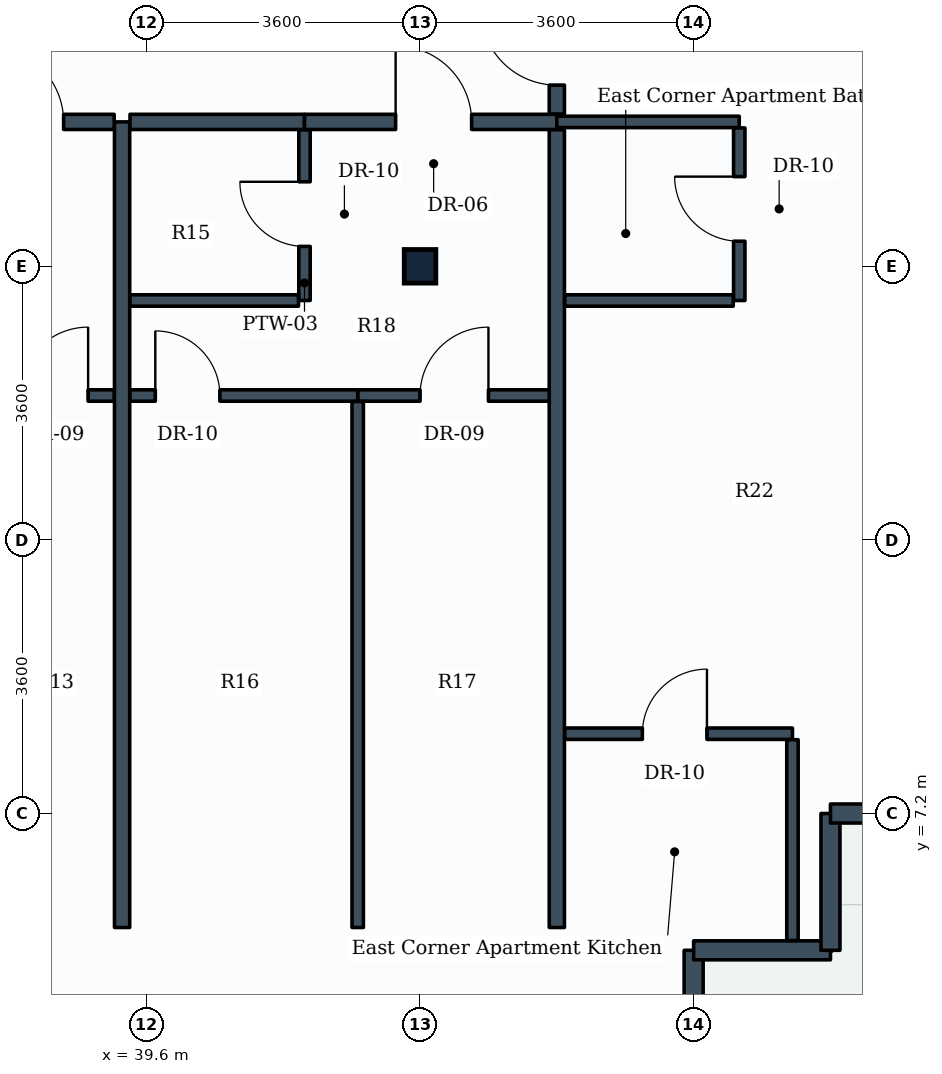
"""IFC4 building model, lengths in metres.
Left out: names, types, materials, properties, quantities, classifications, styles, units other than length and angle.
Written with IfcOpenShell. Run it as: python <this file> out.ifc"""

import sys

from ifc_helpers import new_model, si_unit, direction, frame, frame_2d, origin, origin_2d, place, context, subcontext, project, spatial, rectangle, i_section, extrude, element, fill, save


model = new_model("IFC4")
c1 = context("Model", 3, precision=1e-05, world=origin(), true_north=direction((0.0, 1.0)))
c2 = subcontext(c1, "Body", "Model", "MODEL_VIEW")
j1 = project(units=[si_unit("LENGTHUNIT", "METRE"), si_unit("PLANEANGLEUNIT", "RADIAN")], contexts=[c1])
p1 = place(None, origin())
s1 = spatial("IfcSite", under=j1, at=p1, CompositionType="ELEMENT")
p2 = place(p1, origin())
s2 = spatial("IfcBuilding", under=s1, at=p2, CompositionType="ELEMENT")
p3 = place(p2, frame((0.0, 0.0, 174.8)))
s3 = spatial("IfcBuildingStorey", under=s2, at=p3, CompositionType="ELEMENT", Elevation=174.8)
p4 = place(p3, frame((43.2, 14.4, 0.0), z_axis=(0.0, 0.0, 1.0), x_axis=(1.0, 0.0, 0.0)))
e1 = element("IfcColumn", 1, at=p4, inside=s3, PredefinedType="COLUMN", context=c2, shape_type="SweptSolid", body=[
    extrude(i_section(OverallWidth=0.416, OverallDepth=0.442, WebThickness=0.025, FlangeThickness=0.041, FilletRadius=0.015, at=origin_2d()), origin(), (0.0, 0.0, 1.0), 3.8),
])
p5 = place(p3, frame((46.8, 5.4, 0.0), z_axis=(0.0, 0.0, 1.0), x_axis=(0.0, -1.0, 0.0)))
e2 = element("IfcWall", 2, at=p5, inside=s3, PredefinedType="STANDARD", context=c2, shape_type="SweptSolid", body=[
    extrude(rectangle(XDim=1.8, YDim=0.25, at=frame_2d((0.9, 0.0))), origin(), (0.0, 0.0, 1.0), 2.93),
])
for number, where, z_axis, x_axis in (
    (3, (48.6, 5.4, 0.0), (0.0, 0.0, 1.0), (-1.0, 0.0, 0.0)),
    (4, (48.6, 7.2, 0.0), (0.0, 0.0, 1.0), (0.0, -1.0, 0.0)),
):
    element("IfcWall", number, at=place(p3, frame(where, z_axis=z_axis, x_axis=x_axis)), inside=s3, PredefinedType="STANDARD", context=c2, shape_type="SweptSolid", body=[
        extrude(rectangle(XDim=1.8, YDim=0.25, at=frame_2d((0.9, 0.0))), origin(), (0.0, 0.0, 1.0), 3.535),
    ])
p6 = place(p3, frame((50.4, 7.2, 0.0), z_axis=(0.0, 0.0, 1.0), x_axis=(-1.0, 0.0, 0.0)))
e5 = element("IfcWall", 5, at=p6, inside=s3, PredefinedType="STANDARD", context=c2, shape_type="SweptSolid", body=[
    extrude(rectangle(XDim=1.8, YDim=0.25, at=frame_2d((0.9, 0.0))), origin(), (0.0, 0.0, 1.0), 2.93),
])
p7 = place(p3, frame((39.28, 5.7, 0.0), z_axis=(0.0, 0.0, 1.0), x_axis=(0.0, 1.0, 0.0)))
e6 = element("IfcWall", 6, at=p7, inside=s3, PredefinedType="PARTITIONING", context=c2, shape_type="SweptSolid", body=[
    extrude(rectangle(XDim=10.6, YDim=0.2, at=frame_2d((5.3, 0.0))), origin(), (0.0, 0.0, 1.0), 3.17),
])
p8 = place(p3, frame((36.8, 16.3, 0.0), z_axis=(0.0, 0.0, 1.0), x_axis=(1.0, 0.0, 0.0)))
e7 = element("IfcWall", 7, at=p8, inside=s3, PredefinedType="PARTITIONING", context=c2, shape_type="SweptSolid", body=[
    extrude(rectangle(XDim=2.376, YDim=0.2, at=frame_2d((1.188, 0.0))), origin(), (0.0, 0.0, 1.0), 3.535),
])
p9 = place(p8, frame((0.711, 0.0, 0.0)))
e8 = element("IfcOpeningElement", 8, at=p9, cuts=e7, PredefinedType="OPENING", context=c2, shape_type="SweptSolid", body=[
    extrude(rectangle(XDim=1.0, YDim=2.1, at=frame_2d((0.5, 1.05))), frame((0.0, 0.11, 0.0), z_axis=(0.0, -1.0, 0.0), x_axis=(1.0, 0.0, 0.0)), (0.0, 0.0, 1.0), 0.22),
])
p10 = place(p3, frame((37.5, 12.7, 0.0), z_axis=(0.0, 0.0, 1.0), x_axis=(1.0, 0.0, 0.0)))
e9 = element("IfcWall", 9, at=p10, inside=s3, PredefinedType="PARTITIONING", context=c2, shape_type="SweptSolid", body=[
    extrude(rectangle(XDim=1.676, YDim=0.15, at=frame_2d((0.838, 0.0))), origin(), (0.0, 0.0, 1.0), 3.535),
])
p11 = place(p10, frame((0.433, 0.0, 0.0)))
e10 = element("IfcOpeningElement", 10, at=p11, cuts=e9, PredefinedType="OPENING", context=c2, shape_type="SweptSolid", body=[
    extrude(rectangle(XDim=0.9, YDim=2.1, at=frame_2d((0.45, 1.05))), frame((0.0, 0.085, 0.0), z_axis=(0.0, -1.0, 0.0), x_axis=(1.0, 0.0, 0.0)), (0.0, 0.0, 1.0), 0.17),
])
p12 = place(p3, frame((39.384, 16.3, 0.0), z_axis=(0.0, 0.0, 1.0), x_axis=(1.0, 0.0, 0.0)))
e11 = element("IfcWall", 11, at=p12, inside=s3, PredefinedType="PARTITIONING", context=c2, shape_type="SweptSolid", body=[
    extrude(rectangle(XDim=2.296, YDim=0.2, at=frame_2d((1.148, 0.0))), origin(), (0.0, 0.0, 1.0), 3.17),
])
p13 = place(p3, frame((41.68, 13.95, 0.0), z_axis=(0.0, 0.0, 1.0), x_axis=(0.0, 1.0, 0.0)))
e12 = element("IfcWall", 12, at=p13, inside=s3, PredefinedType="PARTITIONING", context=c2, shape_type="SweptSolid", body=[
    extrude(rectangle(XDim=2.246, YDim=0.15, at=frame_2d((1.123, 0.0))), origin(), (0.0, 0.0, 1.0), 3.17),
])
p14 = place(p13, frame((0.712, 0.0, 0.0)))
e13 = element("IfcOpeningElement", 13, at=p14, cuts=e12, PredefinedType="OPENING", context=c2, shape_type="SweptSolid", body=[
    extrude(rectangle(XDim=0.85, YDim=2.1, at=frame_2d((0.425, 1.05))), frame((0.0, 0.085, 0.0), z_axis=(0.0, -1.0, 0.0), x_axis=(1.0, 0.0, 0.0)), (0.0, 0.0, 1.0), 0.17),
])
p15 = place(p3, frame((39.384, 13.95, 0.0), z_axis=(0.0, 0.0, 1.0), x_axis=(1.0, 0.0, 0.0)))
e14 = element("IfcWall", 14, at=p15, inside=s3, PredefinedType="PARTITIONING", context=c2, shape_type="SweptSolid", body=[
    extrude(rectangle(XDim=2.217, YDim=0.15, at=frame_2d((1.108, 0.0))), origin(), (0.0, 0.0, 1.0), 3.17),
])
p16 = place(p3, frame((41.68, 16.3, 0.0), z_axis=(0.0, 0.0, 1.0), x_axis=(1.0, 0.0, 0.0)))
e15 = element("IfcWall", 15, at=p16, inside=s3, PredefinedType="PARTITIONING", context=c2, shape_type="SweptSolid", body=[
    extrude(rectangle(XDim=3.32, YDim=0.2, at=frame_2d((1.66, 0.0))), origin(), (0.0, 0.0, 1.0), 3.18),
])
p17 = place(p16, frame((1.199, 0.0, 0.0)))
e16 = element("IfcOpeningElement", 16, at=p17, cuts=e15, PredefinedType="OPENING", context=c2, shape_type="SweptSolid", body=[
    extrude(rectangle(XDim=1.0, YDim=2.1, at=frame_2d((0.5, 1.05))), frame((0.0, 0.11, 0.0), z_axis=(0.0, -1.0, 0.0), x_axis=(1.0, 0.0, 0.0)), (0.0, 0.0, 1.0), 0.22),
])
p18 = place(p3, frame((42.38, 12.7, 0.0), z_axis=(0.0, 0.0, 1.0), x_axis=(1.0, 0.0, 0.0)))
e17 = element("IfcWall", 17, at=p18, inside=s3, PredefinedType="PARTITIONING", context=c2, shape_type="SweptSolid", body=[
    extrude(rectangle(XDim=2.62, YDim=0.15, at=frame_2d((1.31, 0.0))), origin(), (0.0, 0.0, 1.0), 3.18),
])
p19 = place(p18, frame((0.82, 0.0, 0.0)))
e18 = element("IfcOpeningElement", 18, at=p19, cuts=e17, PredefinedType="OPENING", context=c2, shape_type="SweptSolid", body=[
    extrude(rectangle(XDim=0.9, YDim=2.1, at=frame_2d((0.45, 1.05))), frame((0.0, 0.085, 0.0), z_axis=(0.0, -1.0, 0.0), x_axis=(1.0, 0.0, 0.0)), (0.0, 0.0, 1.0), 0.17),
])
p20 = place(p3, frame((39.384, 12.7, 0.0), z_axis=(0.0, 0.0, 1.0), x_axis=(1.0, 0.0, 0.0)))
e19 = element("IfcWall", 19, at=p20, inside=s3, PredefinedType="PARTITIONING", context=c2, shape_type="SweptSolid", body=[
    extrude(rectangle(XDim=2.996, YDim=0.15, at=frame_2d((1.498, 0.0))), origin(), (0.0, 0.0, 1.0), 3.17),
])
p21 = place(p20, frame((0.333, 0.0, 0.0)))
e20 = element("IfcOpeningElement", 20, at=p21, cuts=e19, PredefinedType="OPENING", context=c2, shape_type="SweptSolid", body=[
    extrude(rectangle(XDim=0.85, YDim=2.1, at=frame_2d((0.425, 1.05))), frame((0.0, 0.085, 0.0), z_axis=(0.0, -1.0, 0.0), x_axis=(1.0, 0.0, 0.0)), (0.0, 0.0, 1.0), 0.17),
])
p22 = place(p3, frame((42.38, 5.7, 0.0), z_axis=(0.0, 0.0, 1.0), x_axis=(0.0, 1.0, 0.0)))
e21 = element("IfcWall", 21, at=p22, inside=s3, PredefinedType="PARTITIONING", context=c2, shape_type="SweptSolid", body=[
    extrude(rectangle(XDim=6.921, YDim=0.15, at=frame_2d((3.46, 0.0))), origin(), (0.0, 0.0, 1.0), 3.17),
])
p23 = place(p3, frame((45.0, 5.7, 0.0), z_axis=(0.0, 0.0, 1.0), x_axis=(0.0, 1.0, 0.0)))
e22 = element("IfcWall", 22, at=p23, inside=s3, PredefinedType="PARTITIONING", context=c2, shape_type="SweptSolid", body=[
    extrude(rectangle(XDim=10.496, YDim=0.2, at=frame_2d((5.248, 0.0))), origin(), (0.0, 0.0, 1.0), 3.17),
])
p24 = place(p3, frame((45.0, 16.404, 0.0), z_axis=(0.0, 0.0, 1.0), x_axis=(0.0, 1.0, 0.0)))
e23 = element("IfcWall", 23, at=p24, inside=s3, PredefinedType="PARTITIONING", context=c2, shape_type="SweptSolid", body=[
    extrude(rectangle(XDim=1.667, YDim=0.2, at=frame_2d((0.833, 0.0))), origin(), (0.0, 0.0, 1.0), 3.535),
])
p25 = place(p24, frame((0.38, 0.0, 0.0)))
e24 = element("IfcOpeningElement", 24, at=p25, cuts=e23, PredefinedType="OPENING", context=c2, shape_type="SweptSolid", body=[
    extrude(rectangle(XDim=1.0, YDim=2.1, at=frame_2d((0.5, 1.05))), frame((0.0, 0.11, 0.0), z_axis=(0.0, -1.0, 0.0), x_axis=(1.0, 0.0, 0.0)), (0.0, 0.0, 1.0), 0.22),
])
p26 = place(p3, frame((45.0, 16.3, 0.0), z_axis=(0.0, 0.0, 1.0), x_axis=(1.0, 0.0, 0.0)))
e25 = element("IfcWall", 25, at=p26, inside=s3, PredefinedType="PARTITIONING", context=c2, shape_type="SweptSolid", body=[
    extrude(rectangle(XDim=2.4, YDim=0.15, at=frame_2d((1.2, 0.0))), origin(), (0.0, 0.0, 1.0), 3.535),
])
p27 = place(p3, frame((47.4, 13.95, 0.0), z_axis=(0.0, 0.0, 1.0), x_axis=(0.0, 1.0, 0.0)))
e26 = element("IfcWall", 26, at=p27, inside=s3, PredefinedType="PARTITIONING", context=c2, shape_type="SweptSolid", body=[
    extrude(rectangle(XDim=2.271, YDim=0.15, at=frame_2d((1.135, 0.0))), origin(), (0.0, 0.0, 1.0), 3.17),
])
p28 = place(p27, frame((0.78, 0.0, 0.0)))
e27 = element("IfcOpeningElement", 27, at=p28, cuts=e26, PredefinedType="OPENING", context=c2, shape_type="SweptSolid", body=[
    extrude(rectangle(XDim=0.85, YDim=2.1, at=frame_2d((0.425, 1.05))), frame((0.0, 0.085, 0.0), z_axis=(0.0, -1.0, 0.0), x_axis=(1.0, 0.0, 0.0)), (0.0, 0.0, 1.0), 0.17),
])
p29 = place(p3, frame((45.104, 13.95, 0.0), z_axis=(0.0, 0.0, 1.0), x_axis=(1.0, 0.0, 0.0)))
e28 = element("IfcWall", 28, at=p29, inside=s3, PredefinedType="PARTITIONING", context=c2, shape_type="SweptSolid", body=[
    extrude(rectangle(XDim=2.217, YDim=0.15, at=frame_2d((1.108, 0.0))), origin(), (0.0, 0.0, 1.0), 3.535),
])
p30 = place(p3, frame((45.104, 8.25, 0.0), z_axis=(0.0, 0.0, 1.0), x_axis=(1.0, 0.0, 0.0)))
e29 = element("IfcWall", 29, at=p30, inside=s3, PredefinedType="PARTITIONING", context=c2, shape_type="SweptSolid", body=[
    extrude(rectangle(XDim=2.996, YDim=0.15, at=frame_2d((1.498, 0.0))), origin(), (0.0, 0.0, 1.0), 3.535),
])
p31 = place(p30, frame((1.021, 0.0, 0.0)))
e30 = element("IfcOpeningElement", 30, at=p31, cuts=e29, PredefinedType="OPENING", context=c2, shape_type="SweptSolid", body=[
    extrude(rectangle(XDim=0.85, YDim=2.1, at=frame_2d((0.425, 1.05))), frame((0.0, 0.085, 0.0), z_axis=(0.0, -1.0, 0.0), x_axis=(1.0, 0.0, 0.0)), (0.0, 0.0, 1.0), 0.17),
])
p32 = place(p3, frame((48.1, 5.529, 0.0), z_axis=(0.0, 0.0, 1.0), x_axis=(0.0, 1.0, 0.0)))
e31 = element("IfcWall", 31, at=p32, inside=s3, PredefinedType="PARTITIONING", context=c2, shape_type="SweptSolid", body=[
    extrude(rectangle(XDim=2.642, YDim=0.15, at=frame_2d((1.321, 0.0))), origin(), (0.0, 0.0, 1.0), 3.535),
])
p33 = place(p9, origin())
e32 = element("IfcDoor", 32, at=p33, inside=s3, OperationType="SINGLE_SWING_LEFT", PredefinedType="DOOR", context=c2, shape_type="SweptSolid", body=[
    extrude(rectangle(XDim=1.0, YDim=2.1, at=frame_2d((0.5, 1.05))), frame((0.0, 0.025, 0.0), z_axis=(0.0, -1.0, 0.0), x_axis=(1.0, 0.0, 0.0)), (0.0, 0.0, 1.0), 0.05),
])
fill(e8, e32)
p34 = place(p11, origin())
e33 = element("IfcDoor", 33, at=p34, inside=s3, OperationType="SINGLE_SWING_RIGHT", PredefinedType="DOOR", context=c2, shape_type="SweptSolid", body=[
    extrude(rectangle(XDim=0.9, YDim=2.1, at=frame_2d((0.45, 1.05))), frame((0.0, 0.025, 0.0), z_axis=(0.0, -1.0, 0.0), x_axis=(1.0, 0.0, 0.0)), (0.0, 0.0, 1.0), 0.05),
])
fill(e10, e33)
p35 = place(p14, origin())
e34 = element("IfcDoor", 34, at=p35, inside=s3, OperationType="SINGLE_SWING_RIGHT", PredefinedType="DOOR", context=c2, shape_type="SweptSolid", body=[
    extrude(rectangle(XDim=0.85, YDim=2.1, at=frame_2d((0.425, 1.05))), frame((0.0, 0.025, 0.0), z_axis=(0.0, -1.0, 0.0), x_axis=(1.0, 0.0, 0.0)), (0.0, 0.0, 1.0), 0.05),
])
fill(e13, e34)
p36 = place(p17, origin())
e35 = element("IfcDoor", 35, at=p36, inside=s3, OperationType="SINGLE_SWING_LEFT", PredefinedType="DOOR", context=c2, shape_type="SweptSolid", body=[
    extrude(rectangle(XDim=1.0, YDim=2.1, at=frame_2d((0.5, 1.05))), frame((0.0, 0.025, 0.0), z_axis=(0.0, -1.0, 0.0), x_axis=(1.0, 0.0, 0.0)), (0.0, 0.0, 1.0), 0.05),
])
fill(e16, e35)
p37 = place(p19, origin())
e36 = element("IfcDoor", 36, at=p37, inside=s3, OperationType="SINGLE_SWING_RIGHT", PredefinedType="DOOR", context=c2, shape_type="SweptSolid", body=[
    extrude(rectangle(XDim=0.9, YDim=2.1, at=frame_2d((0.45, 1.05))), frame((0.0, 0.025, 0.0), z_axis=(0.0, -1.0, 0.0), x_axis=(1.0, 0.0, 0.0)), (0.0, 0.0, 1.0), 0.05),
])
fill(e18, e36)
p38 = place(p21, origin())
e37 = element("IfcDoor", 37, at=p38, inside=s3, OperationType="SINGLE_SWING_LEFT", PredefinedType="DOOR", context=c2, shape_type="SweptSolid", body=[
    extrude(rectangle(XDim=0.85, YDim=2.1, at=frame_2d((0.425, 1.05))), frame((0.0, 0.025, 0.0), z_axis=(0.0, -1.0, 0.0), x_axis=(1.0, 0.0, 0.0)), (0.0, 0.0, 1.0), 0.05),
])
fill(e20, e37)
p39 = place(p25, origin())
e38 = element("IfcDoor", 38, at=p39, inside=s3, OperationType="SINGLE_SWING_RIGHT", PredefinedType="DOOR", context=c2, shape_type="SweptSolid", body=[
    extrude(rectangle(XDim=1.0, YDim=2.1, at=frame_2d((0.5, 1.05))), frame((0.0, 0.025, 0.0), z_axis=(0.0, -1.0, 0.0), x_axis=(1.0, 0.0, 0.0)), (0.0, 0.0, 1.0), 0.05),
])
fill(e24, e38)
p40 = place(p28, origin())
e39 = element("IfcDoor", 39, at=p40, inside=s3, OperationType="SINGLE_SWING_RIGHT", PredefinedType="DOOR", context=c2, shape_type="SweptSolid", body=[
    extrude(rectangle(XDim=0.85, YDim=2.1, at=frame_2d((0.425, 1.05))), frame((0.0, 0.025, 0.0), z_axis=(0.0, -1.0, 0.0), x_axis=(1.0, 0.0, 0.0)), (0.0, 0.0, 1.0), 0.05),
])
fill(e27, e39)
p41 = place(p31, origin())
e40 = element("IfcDoor", 40, at=p41, inside=s3, OperationType="SINGLE_SWING_RIGHT", PredefinedType="DOOR", context=c2, shape_type="SweptSolid", body=[
    extrude(rectangle(XDim=0.85, YDim=2.1, at=frame_2d((0.425, 1.05))), frame((0.0, 0.025, 0.0), z_axis=(0.0, -1.0, 0.0), x_axis=(1.0, 0.0, 0.0)), (0.0, 0.0, 1.0), 0.05),
])
fill(e30, e40)
save(model, sys.argv[1])
